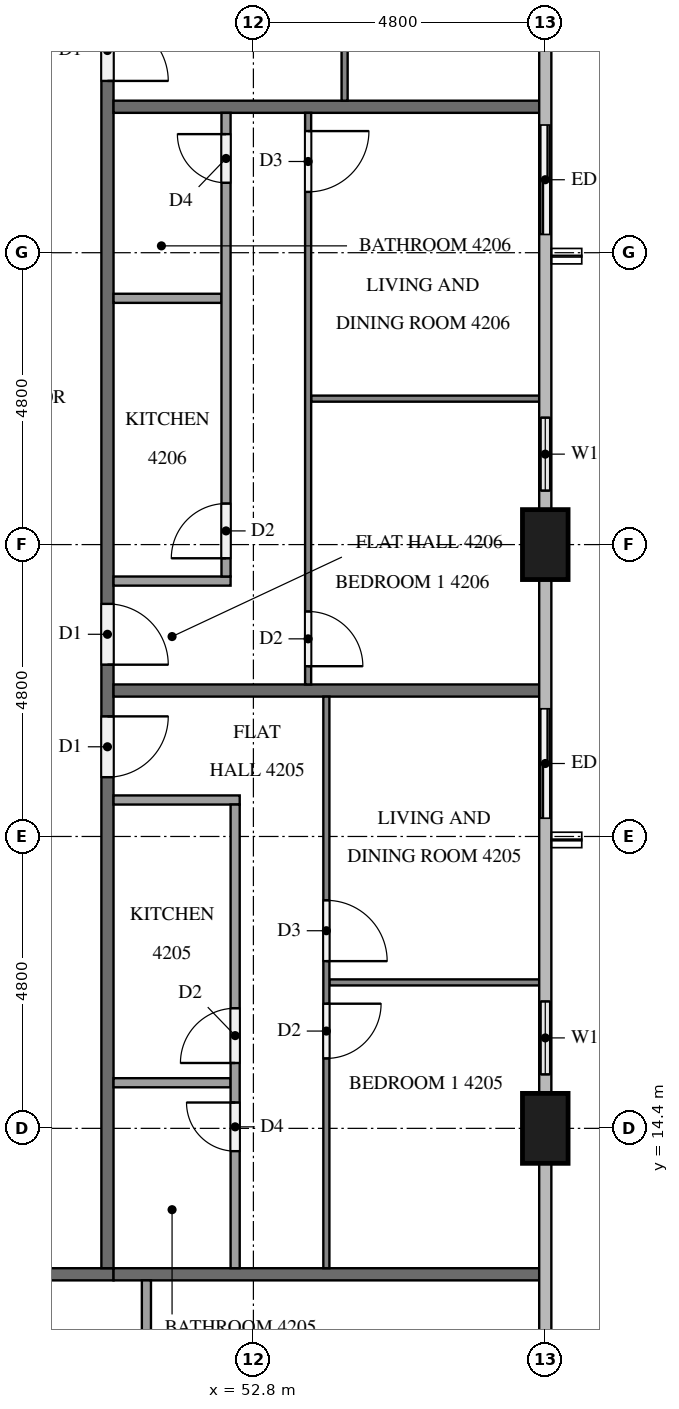
"""IFC4 building model, lengths in metres.
Left out: names, types, materials, properties, quantities, classifications, styles, units other than length and angle.
Written with IfcOpenShell. Run it as: python <this file> out.ifc"""

import sys

from ifc_helpers import new_model, si_unit, direction, frame, frame_2d, origin, origin_2d, place, context, subcontext, project, spatial, rectangle, extrude, element, fill, save


model = new_model("IFC4")
c1 = context("Model", 3, precision=1e-05, world=origin(), true_north=direction((0.0, 1.0)))
c2 = subcontext(c1, "Body", "Model", "MODEL_VIEW")
j1 = project(units=[si_unit("LENGTHUNIT", "METRE"), si_unit("PLANEANGLEUNIT", "RADIAN")], contexts=[c1])
p1 = place(None, origin())
s1 = spatial("IfcSite", under=j1, at=p1, CompositionType="ELEMENT")
p2 = place(p1, origin())
s2 = spatial("IfcBuilding", under=s1, at=p2, CompositionType="ELEMENT")
p3 = place(p2, frame((0.0, 0.0, 163.0)))
s3 = spatial("IfcBuildingStorey", under=s2, at=p3, CompositionType="ELEMENT", Elevation=163.0)
for number, where, z_axis, x_axis in (
    (1, (57.6, 14.4, 0.0), (0.0, 0.0, 1.0), (0.0, 1.0, 0.0)),
    (2, (57.6, 24.0, 0.0), (0.0, 0.0, 1.0), (0.0, 1.0, 0.0)),
):
    element("IfcColumn", number, at=place(p3, frame(where, z_axis=z_axis, x_axis=x_axis)), inside=s3, PredefinedType="COLUMN", context=c2, shape_type="SweptSolid", body=[
        extrude(rectangle(XDim=1.15, YDim=0.75, at=origin_2d()), origin(), (0.0, 0.0, 1.0), 3.2),
    ])
p4 = place(p3, frame((57.6, 14.975, 0.0), z_axis=(0.0, 0.0, 1.0), x_axis=(0.0, 1.0, 0.0)))
e3 = element("IfcWall", 3, at=p4, inside=s3, PredefinedType="SOLIDWALL", context=c2, shape_type="SweptSolid", body=[
    extrude(rectangle(XDim=1.825, YDim=0.15, at=frame_2d((0.913, 0.0))), origin(), (0.0, 0.0, 1.0), 3.2),
])
p5 = place(p4, frame((0.312, 0.0, 0.9)))
e4 = element("IfcOpeningElement", 4, at=p5, cuts=e3, PredefinedType="OPENING", context=c2, shape_type="SweptSolid", body=[
    extrude(rectangle(XDim=1.2, YDim=1.4, at=frame_2d((0.6, 0.7))), frame((0.0, 0.085, 0.0), z_axis=(0.0, -1.0, 0.0), x_axis=(1.0, 0.0, 0.0)), (0.0, 0.0, 1.0), 0.17),
])
p6 = place(p3, frame((57.6, 19.2, 0.0), z_axis=(0.0, 0.0, 1.0), x_axis=(0.0, 1.0, 0.0)))
e5 = element("IfcWall", 5, at=p6, inside=s3, PredefinedType="SOLIDWALL", context=c2, shape_type="SweptSolid", body=[
    extrude(rectangle(XDim=2.4, YDim=0.15, at=frame_2d((1.2, 0.0))), origin(), (0.0, 0.0, 1.0), 3.2),
])
p7 = place(p6, frame((0.3, 0.0, 0.0)))
e6 = element("IfcOpeningElement", 6, at=p7, cuts=e5, PredefinedType="OPENING", context=c2, shape_type="SweptSolid", body=[
    extrude(rectangle(XDim=1.8, YDim=2.4, at=frame_2d((0.9, 1.2))), frame((0.0, 0.085, 0.0), z_axis=(0.0, -1.0, 0.0), x_axis=(1.0, 0.0, 0.0)), (0.0, 0.0, 1.0), 0.17),
])
p8 = place(p3, frame((57.6, 24.575, 0.0), z_axis=(0.0, 0.0, 1.0), x_axis=(0.0, 1.0, 0.0)))
e7 = element("IfcWall", 7, at=p8, inside=s3, PredefinedType="SOLIDWALL", context=c2, shape_type="SweptSolid", body=[
    extrude(rectangle(XDim=1.825, YDim=0.15, at=frame_2d((0.913, 0.0))), origin(), (0.0, 0.0, 1.0), 3.2),
])
p9 = place(p8, frame((0.312, 0.0, 0.9)))
e8 = element("IfcOpeningElement", 8, at=p9, cuts=e7, PredefinedType="OPENING", context=c2, shape_type="SweptSolid", body=[
    extrude(rectangle(XDim=1.2, YDim=1.4, at=frame_2d((0.6, 0.7))), frame((0.0, 0.085, 0.0), z_axis=(0.0, -1.0, 0.0), x_axis=(1.0, 0.0, 0.0)), (0.0, 0.0, 1.0), 0.17),
])
p10 = place(p3, frame((57.6, 28.8, 0.0), z_axis=(0.0, 0.0, 1.0), x_axis=(0.0, 1.0, 0.0)))
e9 = element("IfcWall", 9, at=p10, inside=s3, PredefinedType="SOLIDWALL", context=c2, shape_type="SweptSolid", body=[
    extrude(rectangle(XDim=2.4, YDim=0.15, at=frame_2d((1.2, 0.0))), origin(), (0.0, 0.0, 1.0), 3.2),
])
p11 = place(p10, frame((0.3, 0.0, 0.0)))
e10 = element("IfcOpeningElement", 10, at=p11, cuts=e9, PredefinedType="OPENING", context=c2, shape_type="SweptSolid", body=[
    extrude(rectangle(XDim=1.8, YDim=2.4, at=frame_2d((0.9, 1.2))), frame((0.0, 0.085, 0.0), z_axis=(0.0, -1.0, 0.0), x_axis=(1.0, 0.0, 0.0)), (0.0, 0.0, 1.0), 0.17),
])
p12 = place(p3, frame((50.5, 12.0, 0.0), z_axis=(0.0, 0.0, 1.0), x_axis=(-1.0, 0.0, 0.0)))
e11 = element("IfcWall", 11, at=p12, inside=s3, PredefinedType="PARTITIONING", context=c2, shape_type="SweptSolid", body=[
    extrude(rectangle(XDim=38.6, YDim=0.2, at=frame_2d((19.3, 0.0))), origin(), (0.0, 0.0, 1.0), 3.2),
])
p13 = place(p12, frame((34.125, 0.0, 0.0)))
e12 = element("IfcOpeningElement", 12, at=p13, cuts=e11, PredefinedType="OPENING", context=c2, shape_type="SweptSolid", body=[
    extrude(rectangle(XDim=1.0, YDim=2.1, at=frame_2d((0.5, 1.05))), frame((0.0, 0.11, 0.0), z_axis=(0.0, -1.0, 0.0), x_axis=(1.0, 0.0, 0.0)), (0.0, 0.0, 1.0), 0.22),
])
p14 = place(p12, frame((32.275, 0.0, 0.0)))
e13 = element("IfcOpeningElement", 13, at=p14, cuts=e11, PredefinedType="OPENING", context=c2, shape_type="SweptSolid", body=[
    extrude(rectangle(XDim=1.0, YDim=2.1, at=frame_2d((0.5, 1.05))), frame((0.0, 0.11, 0.0), z_axis=(0.0, -1.0, 0.0), x_axis=(1.0, 0.0, 0.0)), (0.0, 0.0, 1.0), 0.22),
])
p15 = place(p12, frame((12.525, 0.0, 0.0)))
e14 = element("IfcOpeningElement", 14, at=p15, cuts=e11, PredefinedType="OPENING", context=c2, shape_type="SweptSolid", body=[
    extrude(rectangle(XDim=1.0, YDim=2.1, at=frame_2d((0.5, 1.05))), frame((0.0, 0.11, 0.0), z_axis=(0.0, -1.0, 0.0), x_axis=(1.0, 0.0, 0.0)), (0.0, 0.0, 1.0), 0.22),
])
p16 = place(p12, frame((10.625, 0.0, 0.0)))
e15 = element("IfcOpeningElement", 15, at=p16, cuts=e11, PredefinedType="OPENING", context=c2, shape_type="SweptSolid", body=[
    extrude(rectangle(XDim=1.1, YDim=2.1, at=frame_2d((0.55, 1.05))), frame((0.0, 0.11, 0.0), z_axis=(0.0, -1.0, 0.0), x_axis=(1.0, 0.0, 0.0)), (0.0, 0.0, 1.0), 0.22),
])
p17 = place(p3, frame((50.4, 40.7, 0.0), z_axis=(0.0, 0.0, 1.0), x_axis=(0.0, -1.0, 0.0)))
e16 = element("IfcWall", 16, at=p17, inside=s3, PredefinedType="PARTITIONING", context=c2, shape_type="SweptSolid", body=[
    extrude(rectangle(XDim=28.6, YDim=0.2, at=frame_2d((14.3, 0.0))), origin(), (0.0, 0.0, 1.0), 3.2),
])
p18 = place(p17, frame((19.525, 0.0, 0.0)))
e17 = element("IfcOpeningElement", 17, at=p18, cuts=e16, PredefinedType="OPENING", context=c2, shape_type="SweptSolid", body=[
    extrude(rectangle(XDim=1.0, YDim=2.1, at=frame_2d((0.5, 1.05))), frame((0.0, 0.11, 0.0), z_axis=(0.0, -1.0, 0.0), x_axis=(1.0, 0.0, 0.0)), (0.0, 0.0, 1.0), 0.22),
])
p19 = place(p17, frame((17.675, 0.0, 0.0)))
e18 = element("IfcOpeningElement", 18, at=p19, cuts=e16, PredefinedType="OPENING", context=c2, shape_type="SweptSolid", body=[
    extrude(rectangle(XDim=1.0, YDim=2.1, at=frame_2d((0.5, 1.05))), frame((0.0, 0.11, 0.0), z_axis=(0.0, -1.0, 0.0), x_axis=(1.0, 0.0, 0.0)), (0.0, 0.0, 1.0), 0.22),
])
p20 = place(p17, frame((8.075, 0.0, 0.0)))
e19 = element("IfcOpeningElement", 19, at=p20, cuts=e16, PredefinedType="OPENING", context=c2, shape_type="SweptSolid", body=[
    extrude(rectangle(XDim=1.0, YDim=2.1, at=frame_2d((0.5, 1.05))), frame((0.0, 0.11, 0.0), z_axis=(0.0, -1.0, 0.0), x_axis=(1.0, 0.0, 0.0)), (0.0, 0.0, 1.0), 0.22),
])
for number, where, z_axis, x_axis in (
    (20, (50.5, 12.0, 0.0), (0.0, 0.0, 1.0), (1.0, 0.0, 0.0)),
    (21, (50.5, 21.6, 0.0), (0.0, 0.0, 1.0), (1.0, 0.0, 0.0)),
    (22, (50.5, 31.2, 0.0), (0.0, 0.0, 1.0), (1.0, 0.0, 0.0)),
):
    element("IfcWall", number, at=place(p3, frame(where, z_axis=z_axis, x_axis=x_axis)), inside=s3, PredefinedType="PARTITIONING", context=c2, shape_type="SweptSolid", body=[
        extrude(rectangle(XDim=7.0, YDim=0.2, at=frame_2d((3.5, 0.0))), origin(), (0.0, 0.0, 1.0), 3.2),
    ])
p21 = place(p3, frame((51.041, 11.9, 0.0), z_axis=(0.0, 0.0, 1.0), x_axis=(0.0, -1.0, 0.0)))
e23 = element("IfcWall", 23, at=p21, inside=s3, PredefinedType="PARTITIONING", context=c2, shape_type="SweptSolid", body=[
    extrude(rectangle(XDim=4.175, YDim=0.15, at=frame_2d((2.087, 0.0))), origin(), (0.0, 0.0, 1.0), 3.2),
])
p22 = place(p3, frame((54.05, 16.8, 0.0), z_axis=(0.0, 0.0, 1.0), x_axis=(1.0, 0.0, 0.0)))
e24 = element("IfcWall", 24, at=p22, inside=s3, PredefinedType="PARTITIONING", context=c2, shape_type="SweptSolid", body=[
    extrude(rectangle(XDim=3.45, YDim=0.1, at=frame_2d((1.725, 0.0))), origin(), (0.0, 0.0, 1.0), 3.2),
])
p23 = place(p3, frame((54.0, 21.5, 0.0), z_axis=(0.0, 0.0, 1.0), x_axis=(0.0, -1.0, 0.0)))
e25 = element("IfcWall", 25, at=p23, inside=s3, PredefinedType="PARTITIONING", context=c2, shape_type="SweptSolid", body=[
    extrude(rectangle(XDim=9.4, YDim=0.1, at=frame_2d((4.7, 0.0))), origin(), (0.0, 0.0, 1.0), 3.2),
])
p24 = place(p23, frame((3.35, 0.0, 0.0)))
e26 = element("IfcOpeningElement", 26, at=p24, cuts=e25, PredefinedType="OPENING", context=c2, shape_type="SweptSolid", body=[
    extrude(rectangle(XDim=1.0, YDim=2.1, at=frame_2d((0.5, 1.05))), frame((0.0, 0.06, 0.0), z_axis=(0.0, -1.0, 0.0), x_axis=(1.0, 0.0, 0.0)), (0.0, 0.0, 1.0), 0.12),
])
p25 = place(p23, frame((5.05, 0.0, 0.0)))
e27 = element("IfcOpeningElement", 27, at=p25, cuts=e25, PredefinedType="OPENING", context=c2, shape_type="SweptSolid", body=[
    extrude(rectangle(XDim=0.9, YDim=2.1, at=frame_2d((0.45, 1.05))), frame((0.0, 0.06, 0.0), z_axis=(0.0, -1.0, 0.0), x_axis=(1.0, 0.0, 0.0)), (0.0, 0.0, 1.0), 0.12),
])
p26 = place(p3, frame((50.5, 15.15, 0.0), z_axis=(0.0, 0.0, 1.0), x_axis=(1.0, 0.0, 0.0)))
e28 = element("IfcWall", 28, at=p26, inside=s3, PredefinedType="PARTITIONING", context=c2, shape_type="SweptSolid", body=[
    extrude(rectangle(XDim=1.925, YDim=0.15, at=frame_2d((0.962, 0.0))), origin(), (0.0, 0.0, 1.0), 3.2),
])
p27 = place(p3, frame((50.5, 19.8, 0.0), z_axis=(0.0, 0.0, 1.0), x_axis=(1.0, 0.0, 0.0)))
e29 = element("IfcWall", 29, at=p27, inside=s3, PredefinedType="PARTITIONING", context=c2, shape_type="SweptSolid", body=[
    extrude(rectangle(XDim=2.075, YDim=0.15, at=frame_2d((1.038, 0.0))), origin(), (0.0, 0.0, 1.0), 3.2),
])
p28 = place(p3, frame((52.5, 12.1, 0.0), z_axis=(0.0, 0.0, 1.0), x_axis=(0.0, 1.0, 0.0)))
e30 = element("IfcWall", 30, at=p28, inside=s3, PredefinedType="PARTITIONING", context=c2, shape_type="SweptSolid", body=[
    extrude(rectangle(XDim=7.625, YDim=0.15, at=frame_2d((3.812, 0.0))), origin(), (0.0, 0.0, 1.0), 3.2),
])
p29 = place(p28, frame((3.375, 0.0, 0.0)))
e31 = element("IfcOpeningElement", 31, at=p29, cuts=e30, PredefinedType="OPENING", context=c2, shape_type="SweptSolid", body=[
    extrude(rectangle(XDim=0.9, YDim=2.1, at=frame_2d((0.45, 1.05))), frame((0.0, 0.085, 0.0), z_axis=(0.0, -1.0, 0.0), x_axis=(1.0, 0.0, 0.0)), (0.0, 0.0, 1.0), 0.17),
])
p30 = place(p28, frame((1.925, 0.0, 0.0)))
e32 = element("IfcOpeningElement", 32, at=p30, cuts=e30, PredefinedType="OPENING", context=c2, shape_type="SweptSolid", body=[
    extrude(rectangle(XDim=0.8, YDim=2.1, at=frame_2d((0.4, 1.05))), frame((0.0, 0.085, 0.0), z_axis=(0.0, -1.0, 0.0), x_axis=(1.0, 0.0, 0.0)), (0.0, 0.0, 1.0), 0.17),
])
p31 = place(p3, frame((53.75, 26.4, 0.0), z_axis=(0.0, 0.0, 1.0), x_axis=(1.0, 0.0, 0.0)))
e33 = element("IfcWall", 33, at=p31, inside=s3, PredefinedType="PARTITIONING", context=c2, shape_type="SweptSolid", body=[
    extrude(rectangle(XDim=3.75, YDim=0.1, at=frame_2d((1.875, 0.0))), origin(), (0.0, 0.0, 1.0), 3.2),
])
p32 = place(p3, frame((53.7, 31.1, 0.0), z_axis=(0.0, 0.0, 1.0), x_axis=(0.0, -1.0, 0.0)))
e34 = element("IfcWall", 34, at=p32, inside=s3, PredefinedType="PARTITIONING", context=c2, shape_type="SweptSolid", body=[
    extrude(rectangle(XDim=9.4, YDim=0.1, at=frame_2d((4.7, 0.0))), origin(), (0.0, 0.0, 1.0), 3.2),
])
p33 = place(p32, frame((8.2, 0.0, 0.0)))
e35 = element("IfcOpeningElement", 35, at=p33, cuts=e34, PredefinedType="OPENING", context=c2, shape_type="SweptSolid", body=[
    extrude(rectangle(XDim=0.9, YDim=2.1, at=frame_2d((0.45, 1.05))), frame((0.0, 0.06, 0.0), z_axis=(0.0, -1.0, 0.0), x_axis=(1.0, 0.0, 0.0)), (0.0, 0.0, 1.0), 0.12),
])
p34 = place(p32, frame((0.3, 0.0, 0.0)))
e36 = element("IfcOpeningElement", 36, at=p34, cuts=e34, PredefinedType="OPENING", context=c2, shape_type="SweptSolid", body=[
    extrude(rectangle(XDim=1.0, YDim=2.1, at=frame_2d((0.5, 1.05))), frame((0.0, 0.06, 0.0), z_axis=(0.0, -1.0, 0.0), x_axis=(1.0, 0.0, 0.0)), (0.0, 0.0, 1.0), 0.12),
])
p35 = place(p3, frame((50.5, 28.05, 0.0), z_axis=(0.0, 0.0, 1.0), x_axis=(1.0, 0.0, 0.0)))
e37 = element("IfcWall", 37, at=p35, inside=s3, PredefinedType="PARTITIONING", context=c2, shape_type="SweptSolid", body=[
    extrude(rectangle(XDim=1.775, YDim=0.15, at=frame_2d((0.887, 0.0))), origin(), (0.0, 0.0, 1.0), 3.2),
])
p36 = place(p3, frame((50.5, 23.4, 0.0), z_axis=(0.0, 0.0, 1.0), x_axis=(1.0, 0.0, 0.0)))
e38 = element("IfcWall", 38, at=p36, inside=s3, PredefinedType="PARTITIONING", context=c2, shape_type="SweptSolid", body=[
    extrude(rectangle(XDim=1.925, YDim=0.15, at=frame_2d((0.962, 0.0))), origin(), (0.0, 0.0, 1.0), 3.2),
])
p37 = place(p3, frame((52.35, 23.475, 0.0), z_axis=(0.0, 0.0, 1.0), x_axis=(0.0, 1.0, 0.0)))
e39 = element("IfcWall", 39, at=p37, inside=s3, PredefinedType="PARTITIONING", context=c2, shape_type="SweptSolid", body=[
    extrude(rectangle(XDim=7.625, YDim=0.15, at=frame_2d((3.812, 0.0))), origin(), (0.0, 0.0, 1.0), 3.2),
])
p38 = place(p37, frame((0.3, 0.0, 0.0)))
e40 = element("IfcOpeningElement", 40, at=p38, cuts=e39, PredefinedType="OPENING", context=c2, shape_type="SweptSolid", body=[
    extrude(rectangle(XDim=0.9, YDim=2.1, at=frame_2d((0.45, 1.05))), frame((0.0, 0.085, 0.0), z_axis=(0.0, -1.0, 0.0), x_axis=(1.0, 0.0, 0.0)), (0.0, 0.0, 1.0), 0.17),
])
p39 = place(p37, frame((6.475, 0.0, 0.0)))
e41 = element("IfcOpeningElement", 41, at=p39, cuts=e39, PredefinedType="OPENING", context=c2, shape_type="SweptSolid", body=[
    extrude(rectangle(XDim=0.8, YDim=2.1, at=frame_2d((0.4, 1.05))), frame((0.0, 0.085, 0.0), z_axis=(0.0, -1.0, 0.0), x_axis=(1.0, 0.0, 0.0)), (0.0, 0.0, 1.0), 0.17),
])
p40 = place(p3, frame((54.3, 47.498, 0.0), z_axis=(0.0, 0.0, 1.0), x_axis=(0.0, -1.0, 0.0)))
e42 = element("IfcWall", 42, at=p40, inside=s3, PredefinedType="PARTITIONING", context=c2, shape_type="SweptSolid", body=[
    extrude(rectangle(XDim=16.198, YDim=0.1, at=frame_2d((8.099, 0.0))), origin(), (0.0, 0.0, 1.0), 3.2),
])
p41 = place(p40, frame((11.848, 0.0, 0.0)))
e43 = element("IfcOpeningElement", 43, at=p41, cuts=e42, PredefinedType="OPENING", context=c2, shape_type="SweptSolid", body=[
    extrude(rectangle(XDim=0.9, YDim=2.1, at=frame_2d((0.45, 1.05))), frame((0.0, 0.06, 0.0), z_axis=(0.0, -1.0, 0.0), x_axis=(1.0, 0.0, 0.0)), (0.0, 0.0, 1.0), 0.12),
])
p42 = place(p40, frame((10.248, 0.0, 0.0)))
e44 = element("IfcOpeningElement", 44, at=p42, cuts=e42, PredefinedType="OPENING", context=c2, shape_type="SweptSolid", body=[
    extrude(rectangle(XDim=0.9, YDim=2.1, at=frame_2d((0.45, 1.05))), frame((0.0, 0.06, 0.0), z_axis=(0.0, -1.0, 0.0), x_axis=(1.0, 0.0, 0.0)), (0.0, 0.0, 1.0), 0.12),
])
p43 = place(p40, frame((0.3, 0.0, 0.0)))
e45 = element("IfcOpeningElement", 45, at=p43, cuts=e42, PredefinedType="OPENING", context=c2, shape_type="SweptSolid", body=[
    extrude(rectangle(XDim=1.0, YDim=2.1, at=frame_2d((0.5, 1.05))), frame((0.0, 0.06, 0.0), z_axis=(0.0, -1.0, 0.0), x_axis=(1.0, 0.0, 0.0)), (0.0, 0.0, 1.0), 0.12),
])
p44 = place(p5, origin())
e46 = element("IfcWindow", 46, at=p44, inside=s3, PartitioningType="SINGLE_PANEL", PredefinedType="WINDOW", context=c2, shape_type="SweptSolid", body=[
    extrude(rectangle(XDim=1.2, YDim=1.4, at=frame_2d((0.6, 0.7))), frame((0.0, 0.03, 0.0), z_axis=(0.0, -1.0, 0.0), x_axis=(1.0, 0.0, 0.0)), (0.0, 0.0, 1.0), 0.06),
])
fill(e4, e46)
p45 = place(p7, origin())
e47 = element("IfcDoor", 47, at=p45, inside=s3, OperationType="SLIDING_TO_LEFT", PredefinedType="DOOR", context=c2, shape_type="SweptSolid", body=[
    extrude(rectangle(XDim=1.8, YDim=2.4, at=frame_2d((0.9, 1.2))), frame((0.0, 0.025, 0.0), z_axis=(0.0, -1.0, 0.0), x_axis=(1.0, 0.0, 0.0)), (0.0, 0.0, 1.0), 0.05),
])
fill(e6, e47)
p46 = place(p9, origin())
e48 = element("IfcWindow", 48, at=p46, inside=s3, PartitioningType="SINGLE_PANEL", PredefinedType="WINDOW", context=c2, shape_type="SweptSolid", body=[
    extrude(rectangle(XDim=1.2, YDim=1.4, at=frame_2d((0.6, 0.7))), frame((0.0, 0.03, 0.0), z_axis=(0.0, -1.0, 0.0), x_axis=(1.0, 0.0, 0.0)), (0.0, 0.0, 1.0), 0.06),
])
fill(e8, e48)
p47 = place(p11, origin())
e49 = element("IfcDoor", 49, at=p47, inside=s3, OperationType="SLIDING_TO_RIGHT", PredefinedType="DOOR", context=c2, shape_type="SweptSolid", body=[
    extrude(rectangle(XDim=1.8, YDim=2.4, at=frame_2d((0.9, 1.2))), frame((0.0, 0.025, 0.0), z_axis=(0.0, -1.0, 0.0), x_axis=(1.0, 0.0, 0.0)), (0.0, 0.0, 1.0), 0.05),
])
fill(e10, e49)
p48 = place(p18, origin())
e50 = element("IfcDoor", 50, at=p48, inside=s3, OperationType="SINGLE_SWING_LEFT", PredefinedType="DOOR", context=c2, shape_type="SweptSolid", body=[
    extrude(rectangle(XDim=1.0, YDim=2.1, at=frame_2d((0.5, 1.05))), frame((0.0, 0.025, 0.0), z_axis=(0.0, -1.0, 0.0), x_axis=(1.0, 0.0, 0.0)), (0.0, 0.0, 1.0), 0.05),
])
fill(e17, e50)
p49 = place(p19, origin())
e51 = element("IfcDoor", 51, at=p49, inside=s3, OperationType="SINGLE_SWING_RIGHT", PredefinedType="DOOR", context=c2, shape_type="SweptSolid", body=[
    extrude(rectangle(XDim=1.0, YDim=2.1, at=frame_2d((0.5, 1.05))), frame((0.0, 0.025, 0.0), z_axis=(0.0, -1.0, 0.0), x_axis=(1.0, 0.0, 0.0)), (0.0, 0.0, 1.0), 0.05),
])
fill(e18, e51)
p50 = place(p20, origin())
e52 = element("IfcDoor", 52, at=p50, inside=s3, OperationType="SINGLE_SWING_RIGHT", PredefinedType="DOOR", context=c2, shape_type="SweptSolid", body=[
    extrude(rectangle(XDim=1.0, YDim=2.1, at=frame_2d((0.5, 1.05))), frame((0.0, 0.025, 0.0), z_axis=(0.0, -1.0, 0.0), x_axis=(1.0, 0.0, 0.0)), (0.0, 0.0, 1.0), 0.05),
])
fill(e19, e52)
p51 = place(p24, origin())
e53 = element("IfcDoor", 53, at=p51, inside=s3, OperationType="SINGLE_SWING_RIGHT", PredefinedType="DOOR", context=c2, shape_type="SweptSolid", body=[
    extrude(rectangle(XDim=1.0, YDim=2.1, at=frame_2d((0.5, 1.05))), frame((0.0, 0.025, 0.0), z_axis=(0.0, -1.0, 0.0), x_axis=(1.0, 0.0, 0.0)), (0.0, 0.0, 1.0), 0.05),
])
fill(e26, e53)
p52 = place(p25, origin())
e54 = element("IfcDoor", 54, at=p52, inside=s3, OperationType="SINGLE_SWING_LEFT", PredefinedType="DOOR", context=c2, shape_type="SweptSolid", body=[
    extrude(rectangle(XDim=0.9, YDim=2.1, at=frame_2d((0.45, 1.05))), frame((0.0, 0.025, 0.0), z_axis=(0.0, -1.0, 0.0), x_axis=(1.0, 0.0, 0.0)), (0.0, 0.0, 1.0), 0.05),
])
fill(e27, e54)
p53 = place(p29, origin())
e55 = element("IfcDoor", 55, at=p53, inside=s3, OperationType="SINGLE_SWING_LEFT", PredefinedType="DOOR", context=c2, shape_type="SweptSolid", body=[
    extrude(rectangle(XDim=0.9, YDim=2.1, at=frame_2d((0.45, 1.05))), frame((0.0, 0.025, 0.0), z_axis=(0.0, -1.0, 0.0), x_axis=(1.0, 0.0, 0.0)), (0.0, 0.0, 1.0), 0.05),
])
fill(e31, e55)
p54 = place(p30, origin())
e56 = element("IfcDoor", 56, at=p54, inside=s3, OperationType="SINGLE_SWING_RIGHT", PredefinedType="DOOR", context=c2, shape_type="SweptSolid", body=[
    extrude(rectangle(XDim=0.8, YDim=2.1, at=frame_2d((0.4, 1.05))), frame((0.0, 0.025, 0.0), z_axis=(0.0, -1.0, 0.0), x_axis=(1.0, 0.0, 0.0)), (0.0, 0.0, 1.0), 0.05),
])
fill(e32, e56)
p55 = place(p33, origin())
e57 = element("IfcDoor", 57, at=p55, inside=s3, OperationType="SINGLE_SWING_RIGHT", PredefinedType="DOOR", context=c2, shape_type="SweptSolid", body=[
    extrude(rectangle(XDim=0.9, YDim=2.1, at=frame_2d((0.45, 1.05))), frame((0.0, 0.025, 0.0), z_axis=(0.0, -1.0, 0.0), x_axis=(1.0, 0.0, 0.0)), (0.0, 0.0, 1.0), 0.05),
])
fill(e35, e57)
p56 = place(p34, origin())
e58 = element("IfcDoor", 58, at=p56, inside=s3, OperationType="SINGLE_SWING_LEFT", PredefinedType="DOOR", context=c2, shape_type="SweptSolid", body=[
    extrude(rectangle(XDim=1.0, YDim=2.1, at=frame_2d((0.5, 1.05))), frame((0.0, 0.025, 0.0), z_axis=(0.0, -1.0, 0.0), x_axis=(1.0, 0.0, 0.0)), (0.0, 0.0, 1.0), 0.05),
])
fill(e36, e58)
p57 = place(p38, origin())
e59 = element("IfcDoor", 59, at=p57, inside=s3, OperationType="SINGLE_SWING_LEFT", PredefinedType="DOOR", context=c2, shape_type="SweptSolid", body=[
    extrude(rectangle(XDim=0.9, YDim=2.1, at=frame_2d((0.45, 1.05))), frame((0.0, 0.025, 0.0), z_axis=(0.0, -1.0, 0.0), x_axis=(1.0, 0.0, 0.0)), (0.0, 0.0, 1.0), 0.05),
])
fill(e40, e59)
p58 = place(p39, origin())
e60 = element("IfcDoor", 60, at=p58, inside=s3, OperationType="SINGLE_SWING_RIGHT", PredefinedType="DOOR", context=c2, shape_type="SweptSolid", body=[
    extrude(rectangle(XDim=0.8, YDim=2.1, at=frame_2d((0.4, 1.05))), frame((0.0, 0.025, 0.0), z_axis=(0.0, -1.0, 0.0), x_axis=(1.0, 0.0, 0.0)), (0.0, 0.0, 1.0), 0.05),
])
fill(e41, e60)
save(model, sys.argv[1])
